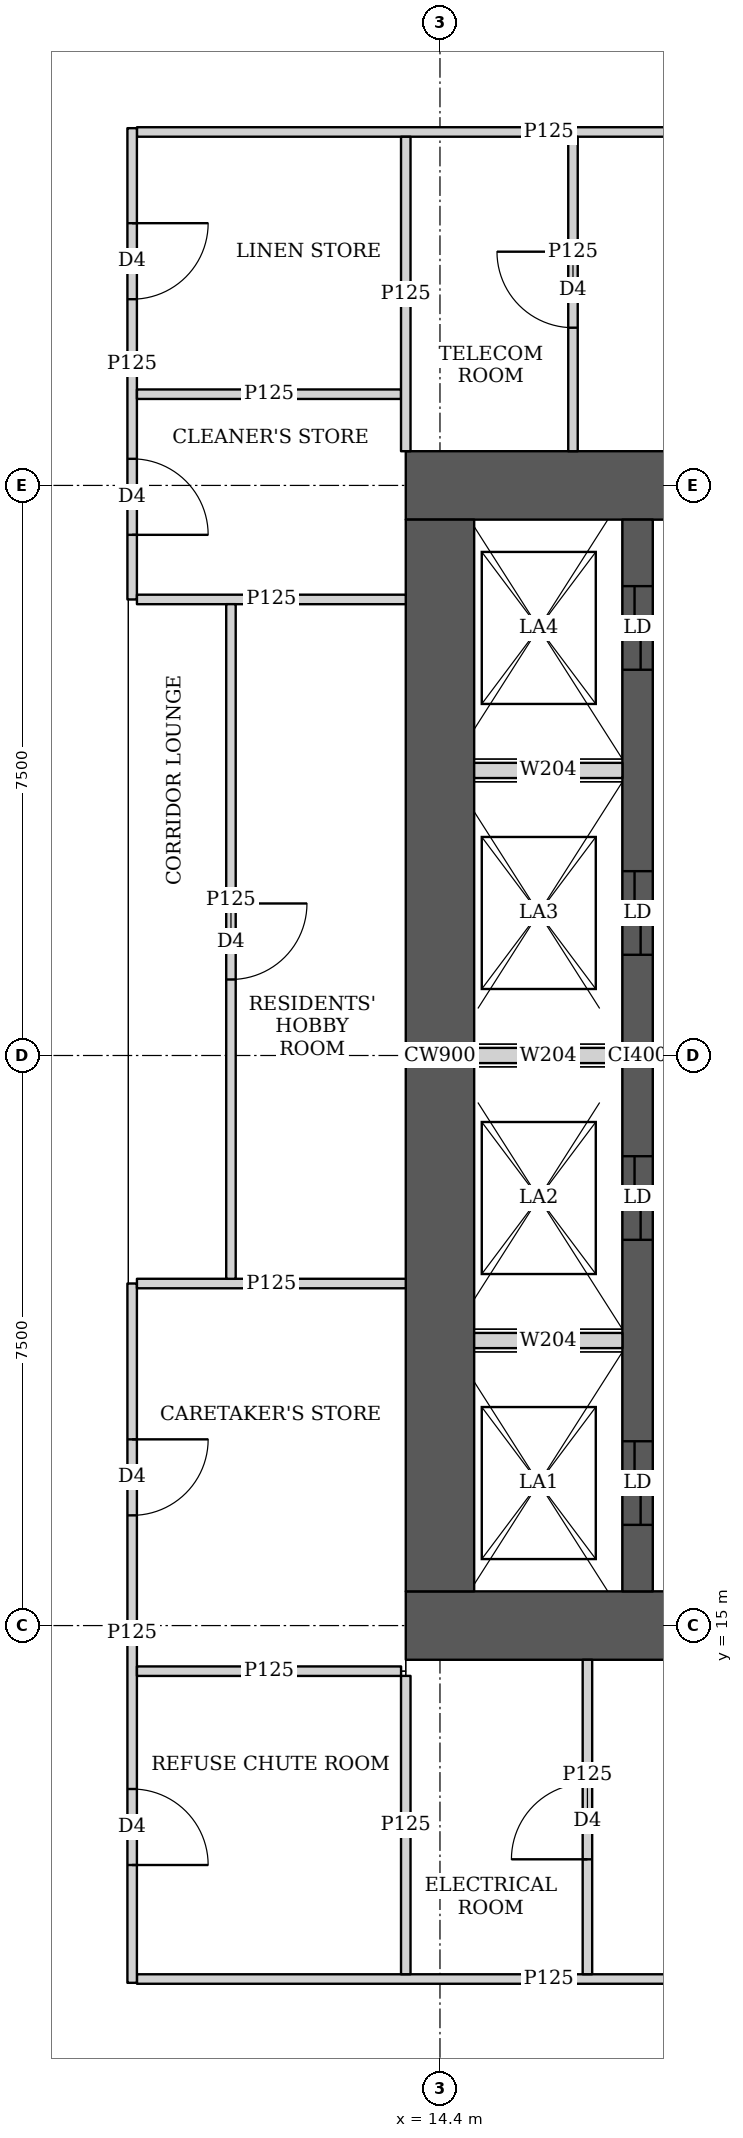
"""IFC4 building model, lengths in metres.
Left out: names, types, materials, properties, quantities, classifications, styles, units other than length and angle.
Written with IfcOpenShell. Run it as: python <this file> out.ifc"""

import sys

from ifc_helpers import new_model, si_unit, direction, frame, frame_2d, origin, place, context, subcontext, project, spatial, rectangle, extrude, element, fill, save


model = new_model("IFC4")
c1 = context("Model", 3, precision=1e-05, world=origin(), true_north=direction((0.0, 1.0)))
c2 = subcontext(c1, "Body", "Model", "MODEL_VIEW")
j1 = project(units=[si_unit("LENGTHUNIT", "METRE"), si_unit("PLANEANGLEUNIT", "RADIAN")], contexts=[c1])
p1 = place(None, origin())
s1 = spatial("IfcSite", under=j1, at=p1, CompositionType="ELEMENT")
p2 = place(p1, origin())
s2 = spatial("IfcBuilding", under=s1, at=p2, CompositionType="ELEMENT")
p3 = place(p2, frame((0.0, 0.0, 42.5)))
s3 = spatial("IfcBuildingStorey", under=s2, at=p3, CompositionType="ELEMENT", Elevation=42.5)
p4 = place(p3, frame((13.95, 15.0, 0.0), z_axis=(0.0, 0.0, 1.0), x_axis=(1.0, 0.0, 0.0)))
e1 = element("IfcWall", 1, at=p4, inside=s3, PredefinedType="SHEAR", context=c2, shape_type="SweptSolid", body=[
    extrude(rectangle(XDim=15.3, YDim=0.9, at=frame_2d((7.65, 0.0))), origin(), (0.0, 0.0, 1.0), 3.75),
])
p5 = place(p4, frame((4.45, 0.0, 0.0)))
e2 = element("IfcOpeningElement", 2, at=p5, cuts=e1, PredefinedType="OPENING", context=c2, shape_type="SweptSolid", body=[
    extrude(rectangle(XDim=1.8, YDim=2.1, at=frame_2d((0.9, 1.05))), frame((0.0, 0.46, 0.0), z_axis=(0.0, -1.0, 0.0), x_axis=(1.0, 0.0, 0.0)), (0.0, 0.0, 1.0), 0.92),
])
p6 = place(p4, frame((10.7, 0.0, 0.0)))
e3 = element("IfcOpeningElement", 3, at=p6, cuts=e1, PredefinedType="OPENING", context=c2, shape_type="SweptSolid", body=[
    extrude(rectangle(XDim=1.1, YDim=2.1, at=frame_2d((0.55, 1.05))), frame((0.0, 0.46, 0.0), z_axis=(0.0, -1.0, 0.0), x_axis=(1.0, 0.0, 0.0)), (0.0, 0.0, 1.0), 0.92),
])
p7 = place(p3, frame((13.95, 30.0, 0.0), z_axis=(0.0, 0.0, 1.0), x_axis=(1.0, 0.0, 0.0)))
e4 = element("IfcWall", 4, at=p7, inside=s3, PredefinedType="SHEAR", context=c2, shape_type="SweptSolid", body=[
    extrude(rectangle(XDim=15.3, YDim=0.9, at=frame_2d((7.65, 0.0))), origin(), (0.0, 0.0, 1.0), 3.75),
])
p8 = place(p7, frame((4.45, 0.0, 0.0)))
e5 = element("IfcOpeningElement", 5, at=p8, cuts=e4, PredefinedType="OPENING", context=c2, shape_type="SweptSolid", body=[
    extrude(rectangle(XDim=1.8, YDim=2.1, at=frame_2d((0.9, 1.05))), frame((0.0, 0.46, 0.0), z_axis=(0.0, -1.0, 0.0), x_axis=(1.0, 0.0, 0.0)), (0.0, 0.0, 1.0), 0.92),
])
p9 = place(p7, frame((10.7, 0.0, 0.0)))
e6 = element("IfcOpeningElement", 6, at=p9, cuts=e4, PredefinedType="OPENING", context=c2, shape_type="SweptSolid", body=[
    extrude(rectangle(XDim=1.1, YDim=2.1, at=frame_2d((0.55, 1.05))), frame((0.0, 0.46, 0.0), z_axis=(0.0, -1.0, 0.0), x_axis=(1.0, 0.0, 0.0)), (0.0, 0.0, 1.0), 0.92),
])
p10 = place(p3, frame((14.4, 15.45, 0.0), z_axis=(0.0, 0.0, 1.0), x_axis=(0.0, 1.0, 0.0)))
e7 = element("IfcWall", 7, at=p10, inside=s3, PredefinedType="SHEAR", context=c2, shape_type="SweptSolid", body=[
    extrude(rectangle(XDim=14.1, YDim=0.9, at=frame_2d((7.05, 0.0))), origin(), (0.0, 0.0, 1.0), 3.75),
])
p11 = place(p3, frame((17.0, 15.45, 0.0), z_axis=(0.0, 0.0, 1.0), x_axis=(0.0, 1.0, 0.0)))
e8 = element("IfcWall", 8, at=p11, inside=s3, PredefinedType="SHEAR", context=c2, shape_type="SweptSolid", body=[
    extrude(rectangle(XDim=14.1, YDim=0.4, at=frame_2d((7.05, 0.0))), origin(), (0.0, 0.0, 1.0), 3.75),
])
p12 = place(p11, frame((0.875, 0.0, 0.0)))
e9 = element("IfcOpeningElement", 9, at=p12, cuts=e8, PredefinedType="OPENING", context=c2, shape_type="SweptSolid", body=[
    extrude(rectangle(XDim=1.1, YDim=2.1, at=frame_2d((0.55, 1.05))), frame((0.0, 0.21, 0.0), z_axis=(0.0, -1.0, 0.0), x_axis=(1.0, 0.0, 0.0)), (0.0, 0.0, 1.0), 0.42),
])
p13 = place(p11, frame((4.625, 0.0, 0.0)))
e10 = element("IfcOpeningElement", 10, at=p13, cuts=e8, PredefinedType="OPENING", context=c2, shape_type="SweptSolid", body=[
    extrude(rectangle(XDim=1.1, YDim=2.1, at=frame_2d((0.55, 1.05))), frame((0.0, 0.21, 0.0), z_axis=(0.0, -1.0, 0.0), x_axis=(1.0, 0.0, 0.0)), (0.0, 0.0, 1.0), 0.42),
])
p14 = place(p11, frame((8.375, 0.0, 0.0)))
e11 = element("IfcOpeningElement", 11, at=p14, cuts=e8, PredefinedType="OPENING", context=c2, shape_type="SweptSolid", body=[
    extrude(rectangle(XDim=1.1, YDim=2.1, at=frame_2d((0.55, 1.05))), frame((0.0, 0.21, 0.0), z_axis=(0.0, -1.0, 0.0), x_axis=(1.0, 0.0, 0.0)), (0.0, 0.0, 1.0), 0.42),
])
p15 = place(p11, frame((12.125, 0.0, 0.0)))
e12 = element("IfcOpeningElement", 12, at=p15, cuts=e8, PredefinedType="OPENING", context=c2, shape_type="SweptSolid", body=[
    extrude(rectangle(XDim=1.1, YDim=2.1, at=frame_2d((0.55, 1.05))), frame((0.0, 0.21, 0.0), z_axis=(0.0, -1.0, 0.0), x_axis=(1.0, 0.0, 0.0)), (0.0, 0.0, 1.0), 0.42),
])
p16 = place(p3, frame((10.35, 10.3, 0.0), z_axis=(0.0, 0.0, 1.0), x_axis=(0.0, 1.0, 0.0)))
e13 = element("IfcWall", 13, at=p16, inside=s3, PredefinedType="PARTITIONING", context=c2, shape_type="SweptSolid", body=[
    extrude(rectangle(XDim=9.2, YDim=0.125, at=frame_2d((4.6, 0.0))), origin(), (0.0, 0.0, 1.0), 3.5),
])
p17 = place(p16, frame((1.55, 0.0, 0.0)))
e14 = element("IfcOpeningElement", 14, at=p17, cuts=e13, PredefinedType="OPENING", context=c2, shape_type="SweptSolid", body=[
    extrude(rectangle(XDim=1.0, YDim=2.1, at=frame_2d((0.5, 1.05))), frame((0.0, 0.073, 0.0), z_axis=(0.0, -1.0, 0.0), x_axis=(1.0, 0.0, 0.0)), (0.0, 0.0, 1.0), 0.145),
])
p18 = place(p16, frame((6.15, 0.0, 0.0)))
e15 = element("IfcOpeningElement", 15, at=p18, cuts=e13, PredefinedType="OPENING", context=c2, shape_type="SweptSolid", body=[
    extrude(rectangle(XDim=1.0, YDim=2.1, at=frame_2d((0.5, 1.05))), frame((0.0, 0.073, 0.0), z_axis=(0.0, -1.0, 0.0), x_axis=(1.0, 0.0, 0.0)), (0.0, 0.0, 1.0), 0.145),
])
p19 = place(p3, frame((10.35, 28.5, 0.0), z_axis=(0.0, 0.0, 1.0), x_axis=(0.0, 1.0, 0.0)))
e16 = element("IfcWall", 16, at=p19, inside=s3, PredefinedType="PARTITIONING", context=c2, shape_type="SweptSolid", body=[
    extrude(rectangle(XDim=6.2, YDim=0.125, at=frame_2d((3.1, 0.0))), origin(), (0.0, 0.0, 1.0), 3.5),
])
p20 = place(p19, frame((0.85, 0.0, 0.0)))
e17 = element("IfcOpeningElement", 17, at=p20, cuts=e16, PredefinedType="OPENING", context=c2, shape_type="SweptSolid", body=[
    extrude(rectangle(XDim=1.0, YDim=2.1, at=frame_2d((0.5, 1.05))), frame((0.0, 0.073, 0.0), z_axis=(0.0, -1.0, 0.0), x_axis=(1.0, 0.0, 0.0)), (0.0, 0.0, 1.0), 0.145),
])
p21 = place(p19, frame((3.95, 0.0, 0.0)))
e18 = element("IfcOpeningElement", 18, at=p21, cuts=e16, PredefinedType="OPENING", context=c2, shape_type="SweptSolid", body=[
    extrude(rectangle(XDim=1.0, YDim=2.1, at=frame_2d((0.5, 1.05))), frame((0.0, 0.073, 0.0), z_axis=(0.0, -1.0, 0.0), x_axis=(1.0, 0.0, 0.0)), (0.0, 0.0, 1.0), 0.145),
])
p22 = place(p3, frame((11.65, 19.562, 0.0), z_axis=(0.0, 0.0, 1.0), x_axis=(0.0, 1.0, 0.0)))
e19 = element("IfcWall", 19, at=p22, inside=s3, PredefinedType="PARTITIONING", context=c2, shape_type="SweptSolid", body=[
    extrude(rectangle(XDim=8.876, YDim=0.125, at=frame_2d((4.438, 0.0))), origin(), (0.0, 0.0, 1.0), 3.5),
])
p23 = place(p22, frame((3.938, 0.0, 0.0)))
e20 = element("IfcOpeningElement", 20, at=p23, cuts=e19, PredefinedType="OPENING", context=c2, shape_type="SweptSolid", body=[
    extrude(rectangle(XDim=1.0, YDim=2.1, at=frame_2d((0.5, 1.05))), frame((0.0, 0.073, 0.0), z_axis=(0.0, -1.0, 0.0), x_axis=(1.0, 0.0, 0.0)), (0.0, 0.0, 1.0), 0.145),
])
p24 = place(p3, frame((10.413, 14.4, 0.0), z_axis=(0.0, 0.0, 1.0), x_axis=(1.0, 0.0, 0.0)))
e21 = element("IfcWall", 21, at=p24, inside=s3, PredefinedType="PARTITIONING", context=c2, shape_type="SweptSolid", body=[
    extrude(rectangle(XDim=3.475, YDim=0.125, at=frame_2d((1.737, 0.0))), origin(), (0.0, 0.0, 1.0), 3.5),
])
for number, where, z_axis, x_axis in (
    (22, (10.413, 19.5, 0.0), (0.0, 0.0, 1.0), (1.0, 0.0, 0.0)),
    (23, (10.413, 28.5, 0.0), (0.0, 0.0, 1.0), (1.0, 0.0, 0.0)),
):
    element("IfcWall", number, at=place(p3, frame(where, z_axis=z_axis, x_axis=x_axis)), inside=s3, PredefinedType="PARTITIONING", context=c2, shape_type="SweptSolid", body=[
        extrude(rectangle(XDim=3.537, YDim=0.125, at=frame_2d((1.769, 0.0))), origin(), (0.0, 0.0, 1.0), 3.5),
    ])
p25 = place(p3, frame((10.413, 31.2, 0.0), z_axis=(0.0, 0.0, 1.0), x_axis=(1.0, 0.0, 0.0)))
e24 = element("IfcWall", 24, at=p25, inside=s3, PredefinedType="PARTITIONING", context=c2, shape_type="SweptSolid", body=[
    extrude(rectangle(XDim=3.475, YDim=0.125, at=frame_2d((1.737, 0.0))), origin(), (0.0, 0.0, 1.0), 3.5),
])
p26 = place(p3, frame((13.95, 10.413, 0.0), z_axis=(0.0, 0.0, 1.0), x_axis=(0.0, 1.0, 0.0)))
e25 = element("IfcWall", 25, at=p26, inside=s3, PredefinedType="PARTITIONING", context=c2, shape_type="SweptSolid", body=[
    extrude(rectangle(XDim=3.925, YDim=0.125, at=frame_2d((1.962, 0.0))), origin(), (0.0, 0.0, 1.0), 3.5),
])
p27 = place(p3, frame((13.95, 30.45, 0.0), z_axis=(0.0, 0.0, 1.0), x_axis=(0.0, 1.0, 0.0)))
e26 = element("IfcWall", 26, at=p27, inside=s3, PredefinedType="PARTITIONING", context=c2, shape_type="SweptSolid", body=[
    extrude(rectangle(XDim=4.137, YDim=0.125, at=frame_2d((2.068, 0.0))), origin(), (0.0, 0.0, 1.0), 3.5),
])
p28 = place(p3, frame((10.413, 10.35, 0.0), z_axis=(0.0, 0.0, 1.0), x_axis=(1.0, 0.0, 0.0)))
e27 = element("IfcWall", 27, at=p28, inside=s3, PredefinedType="PARTITIONING", context=c2, shape_type="SweptSolid", body=[
    extrude(rectangle(XDim=10.837, YDim=0.125, at=frame_2d((5.418, 0.0))), origin(), (0.0, 0.0, 1.0), 3.5),
])
p29 = place(p28, frame((7.582, 0.0, 0.0)))
e28 = element("IfcOpeningElement", 28, at=p29, cuts=e27, PredefinedType="OPENING", context=c2, shape_type="SweptSolid", body=[
    extrude(rectangle(XDim=1.8, YDim=2.1, at=frame_2d((0.9, 1.05))), frame((0.0, 0.073, 0.0), z_axis=(0.0, -1.0, 0.0), x_axis=(1.0, 0.0, 0.0)), (0.0, 0.0, 1.0), 0.145),
])
p30 = place(p3, frame((10.413, 34.65, 0.0), z_axis=(0.0, 0.0, 1.0), x_axis=(1.0, 0.0, 0.0)))
e29 = element("IfcWall", 29, at=p30, inside=s3, PredefinedType="PARTITIONING", context=c2, shape_type="SweptSolid", body=[
    extrude(rectangle(XDim=10.837, YDim=0.125, at=frame_2d((5.418, 0.0))), origin(), (0.0, 0.0, 1.0), 3.5),
])
p31 = place(p30, frame((7.487, 0.0, 0.0)))
e30 = element("IfcOpeningElement", 30, at=p31, cuts=e29, PredefinedType="OPENING", context=c2, shape_type="SweptSolid", body=[
    extrude(rectangle(XDim=1.8, YDim=2.1, at=frame_2d((0.9, 1.05))), frame((0.0, 0.073, 0.0), z_axis=(0.0, -1.0, 0.0), x_axis=(1.0, 0.0, 0.0)), (0.0, 0.0, 1.0), 0.145),
])
p32 = place(p3, frame((16.34, 10.413, 0.0), z_axis=(0.0, 0.0, 1.0), x_axis=(0.0, 1.0, 0.0)))
e31 = element("IfcWall", 31, at=p32, inside=s3, PredefinedType="PARTITIONING", context=c2, shape_type="SweptSolid", body=[
    extrude(rectangle(XDim=4.137, YDim=0.125, at=frame_2d((2.068, 0.0))), origin(), (0.0, 0.0, 1.0), 3.5),
])
p33 = place(p32, frame((1.512, 0.0, 0.0)))
e32 = element("IfcOpeningElement", 32, at=p33, cuts=e31, PredefinedType="OPENING", context=c2, shape_type="SweptSolid", body=[
    extrude(rectangle(XDim=1.0, YDim=2.1, at=frame_2d((0.5, 1.05))), frame((0.0, 0.073, 0.0), z_axis=(0.0, -1.0, 0.0), x_axis=(1.0, 0.0, 0.0)), (0.0, 0.0, 1.0), 0.145),
])
p34 = place(p3, frame((16.15, 30.45, 0.0), z_axis=(0.0, 0.0, 1.0), x_axis=(0.0, 1.0, 0.0)))
e33 = element("IfcWall", 33, at=p34, inside=s3, PredefinedType="PARTITIONING", context=c2, shape_type="SweptSolid", body=[
    extrude(rectangle(XDim=4.137, YDim=0.125, at=frame_2d((2.068, 0.0))), origin(), (0.0, 0.0, 1.0), 3.5),
])
p35 = place(p34, frame((1.625, 0.0, 0.0)))
e34 = element("IfcOpeningElement", 34, at=p35, cuts=e33, PredefinedType="OPENING", context=c2, shape_type="SweptSolid", body=[
    extrude(rectangle(XDim=1.0, YDim=2.1, at=frame_2d((0.5, 1.05))), frame((0.0, 0.073, 0.0), z_axis=(0.0, -1.0, 0.0), x_axis=(1.0, 0.0, 0.0)), (0.0, 0.0, 1.0), 0.145),
])
for number, where, z_axis, x_axis in (
    (35, (14.85, 18.75, 0.0), (0.0, 0.0, 1.0), (1.0, 0.0, 0.0)),
    (36, (14.85, 22.5, 0.0), (0.0, 0.0, 1.0), (1.0, 0.0, 0.0)),
    (37, (14.85, 26.25, 0.0), (0.0, 0.0, 1.0), (1.0, 0.0, 0.0)),
):
    element("IfcWall", number, at=place(p3, frame(where, z_axis=z_axis, x_axis=x_axis)), inside=s3, PredefinedType="SOLIDWALL", context=c2, shape_type="SweptSolid", body=[
        extrude(rectangle(XDim=1.95, YDim=0.2, at=frame_2d((0.975, 0.0))), origin(), (0.0, 0.0, 1.0), 3.5),
    ])
p36 = place(p17, origin())
e38 = element("IfcDoor", 38, at=p36, inside=s3, OperationType="SINGLE_SWING_RIGHT", PredefinedType="DOOR", context=c2, shape_type="SweptSolid", body=[
    extrude(rectangle(XDim=1.0, YDim=2.1, at=frame_2d((0.5, 1.05))), frame((0.0, 0.025, 0.0), z_axis=(0.0, -1.0, 0.0), x_axis=(1.0, 0.0, 0.0)), (0.0, 0.0, 1.0), 0.05),
])
fill(e14, e38)
p37 = place(p18, origin())
e39 = element("IfcDoor", 39, at=p37, inside=s3, OperationType="SINGLE_SWING_LEFT", PredefinedType="DOOR", context=c2, shape_type="SweptSolid", body=[
    extrude(rectangle(XDim=1.0, YDim=2.1, at=frame_2d((0.5, 1.05))), frame((0.0, 0.025, 0.0), z_axis=(0.0, -1.0, 0.0), x_axis=(1.0, 0.0, 0.0)), (0.0, 0.0, 1.0), 0.05),
])
fill(e15, e39)
p38 = place(p23, origin())
e40 = element("IfcDoor", 40, at=p38, inside=s3, OperationType="SINGLE_SWING_LEFT", PredefinedType="DOOR", context=c2, shape_type="SweptSolid", body=[
    extrude(rectangle(XDim=1.0, YDim=2.1, at=frame_2d((0.5, 1.05))), frame((0.0, 0.025, 0.0), z_axis=(0.0, -1.0, 0.0), x_axis=(1.0, 0.0, 0.0)), (0.0, 0.0, 1.0), 0.05),
])
fill(e20, e40)
p39 = place(p20, origin())
e41 = element("IfcDoor", 41, at=p39, inside=s3, OperationType="SINGLE_SWING_RIGHT", PredefinedType="DOOR", context=c2, shape_type="SweptSolid", body=[
    extrude(rectangle(XDim=1.0, YDim=2.1, at=frame_2d((0.5, 1.05))), frame((0.0, 0.025, 0.0), z_axis=(0.0, -1.0, 0.0), x_axis=(1.0, 0.0, 0.0)), (0.0, 0.0, 1.0), 0.05),
])
fill(e17, e41)
p40 = place(p21, origin())
e42 = element("IfcDoor", 42, at=p40, inside=s3, OperationType="SINGLE_SWING_LEFT", PredefinedType="DOOR", context=c2, shape_type="SweptSolid", body=[
    extrude(rectangle(XDim=1.0, YDim=2.1, at=frame_2d((0.5, 1.05))), frame((0.0, 0.025, 0.0), z_axis=(0.0, -1.0, 0.0), x_axis=(1.0, 0.0, 0.0)), (0.0, 0.0, 1.0), 0.05),
])
fill(e18, e42)
p41 = place(p33, origin())
e43 = element("IfcDoor", 43, at=p41, inside=s3, OperationType="SINGLE_SWING_LEFT", PredefinedType="DOOR", context=c2, shape_type="SweptSolid", body=[
    extrude(rectangle(XDim=1.0, YDim=2.1, at=frame_2d((0.5, 1.05))), frame((0.0, 0.025, 0.0), z_axis=(0.0, -1.0, 0.0), x_axis=(1.0, 0.0, 0.0)), (0.0, 0.0, 1.0), 0.05),
])
fill(e32, e43)
p42 = place(p35, origin())
e44 = element("IfcDoor", 44, at=p42, inside=s3, OperationType="SINGLE_SWING_RIGHT", PredefinedType="DOOR", context=c2, shape_type="SweptSolid", body=[
    extrude(rectangle(XDim=1.0, YDim=2.1, at=frame_2d((0.5, 1.05))), frame((0.0, 0.025, 0.0), z_axis=(0.0, -1.0, 0.0), x_axis=(1.0, 0.0, 0.0)), (0.0, 0.0, 1.0), 0.05),
])
fill(e34, e44)
p43 = place(p12, origin())
e45 = element("IfcDoor", 45, at=p43, inside=s3, OperationType="DOUBLE_DOOR_SLIDING", PredefinedType="DOOR", context=c2, shape_type="SweptSolid", body=[
    extrude(rectangle(XDim=1.1, YDim=2.1, at=frame_2d((0.55, 1.05))), frame((0.0, 0.025, 0.0), z_axis=(0.0, -1.0, 0.0), x_axis=(1.0, 0.0, 0.0)), (0.0, 0.0, 1.0), 0.05),
])
fill(e9, e45)
p44 = place(p13, origin())
e46 = element("IfcDoor", 46, at=p44, inside=s3, OperationType="DOUBLE_DOOR_SLIDING", PredefinedType="DOOR", context=c2, shape_type="SweptSolid", body=[
    extrude(rectangle(XDim=1.1, YDim=2.1, at=frame_2d((0.55, 1.05))), frame((0.0, 0.025, 0.0), z_axis=(0.0, -1.0, 0.0), x_axis=(1.0, 0.0, 0.0)), (0.0, 0.0, 1.0), 0.05),
])
fill(e10, e46)
p45 = place(p14, origin())
e47 = element("IfcDoor", 47, at=p45, inside=s3, OperationType="DOUBLE_DOOR_SLIDING", PredefinedType="DOOR", context=c2, shape_type="SweptSolid", body=[
    extrude(rectangle(XDim=1.1, YDim=2.1, at=frame_2d((0.55, 1.05))), frame((0.0, 0.025, 0.0), z_axis=(0.0, -1.0, 0.0), x_axis=(1.0, 0.0, 0.0)), (0.0, 0.0, 1.0), 0.05),
])
fill(e11, e47)
p46 = place(p15, origin())
e48 = element("IfcDoor", 48, at=p46, inside=s3, OperationType="DOUBLE_DOOR_SLIDING", PredefinedType="DOOR", context=c2, shape_type="SweptSolid", body=[
    extrude(rectangle(XDim=1.1, YDim=2.1, at=frame_2d((0.55, 1.05))), frame((0.0, 0.025, 0.0), z_axis=(0.0, -1.0, 0.0), x_axis=(1.0, 0.0, 0.0)), (0.0, 0.0, 1.0), 0.05),
])
fill(e12, e48)
save(model, sys.argv[1])
